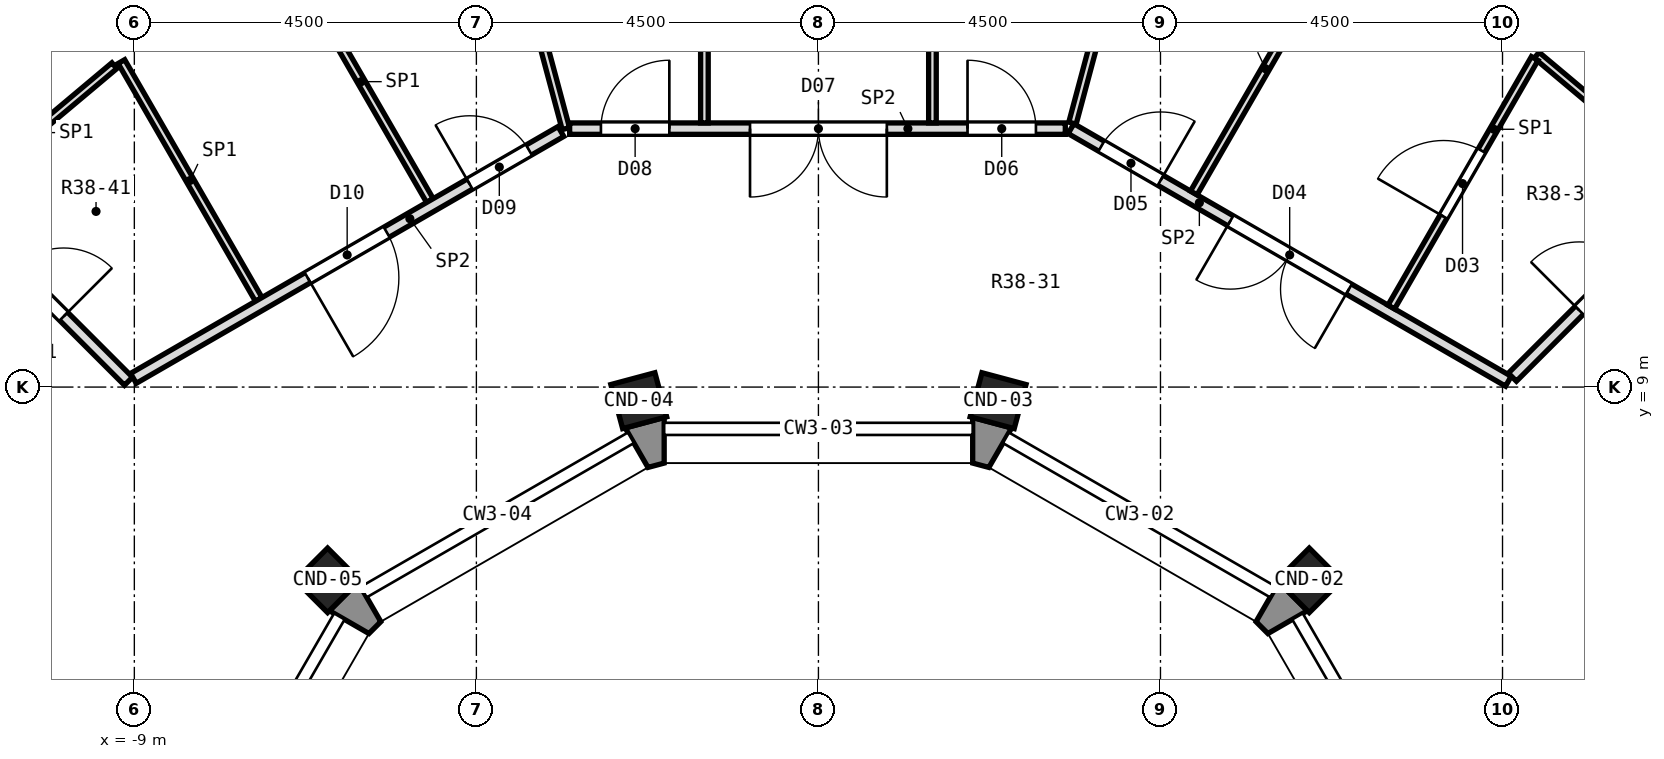
"""IFC4 building model, lengths in metres.
Left out: names, types, materials, properties, quantities, classifications, styles, units other than length and angle.
Written with IfcOpenShell. Run it as: python <this file> out.ifc"""

import sys

from ifc_helpers import new_model, si_unit, direction, frame, frame_2d, origin, origin_2d, place, context, subcontext, project, spatial, polyline, rectangle, outline, extrude, element, fill, save


model = new_model("IFC4")
c1 = context("Model", 3, precision=1e-05, world=origin(), true_north=direction((0.0, 1.0)))
c2 = subcontext(c1, "Body", "Model", "MODEL_VIEW")
j1 = project(units=[si_unit("LENGTHUNIT", "METRE"), si_unit("PLANEANGLEUNIT", "RADIAN")], contexts=[c1])
p1 = place(None, origin())
s1 = spatial("IfcSite", under=j1, at=p1, CompositionType="ELEMENT")
p2 = place(p1, origin())
s2 = spatial("IfcBuilding", under=s1, at=p2, CompositionType="ELEMENT")
p3 = place(p2, frame((0.0, 0.0, 279.2)))
s3 = spatial("IfcBuildingStorey", under=s2, at=p3, CompositionType="ELEMENT", Elevation=279.2)
for number, where, z_axis, x_axis in (
    (1, (6.458, 6.458, 0.0), (0.0, 0.0, 1.0), (0.707, 0.707, 0.0)),
    (2, (2.364, 8.821, 0.0), (0.0, 0.0, 1.0), (0.259, 0.966, 0.0)),
    (3, (-2.364, 8.821, 0.0), (0.0, 0.0, 1.0), (-0.259, 0.966, 0.0)),
    (4, (-6.458, 6.458, 0.0), (0.0, 0.0, 1.0), (-0.707, 0.707, 0.0)),
):
    element("IfcColumn", number, at=place(p3, frame(where, z_axis=z_axis, x_axis=x_axis)), inside=s3, PredefinedType="COLUMN", context=c2, shape_type="SweptSolid", body=[
        extrude(rectangle(XDim=0.6, YDim=0.6, at=origin_2d()), origin(), (0.0, 0.0, 1.0), 5.0),
    ])
p4 = place(p3, origin())
e5 = element("IfcWall", 5, at=p4, inside=s3, PredefinedType="SOLIDWALL", context=c2, shape_type="SweptSolid", body=[
    extrude(outline(polyline([(6.058, 6.433), (5.758, 5.914), (5.914, 5.758), (6.433, 6.058), (6.058, 6.433)])), origin(), (0.0, 0.0, 1.0), 4.45),
])
p5 = place(p3, origin())
e6 = element("IfcWall", 6, at=p5, inside=s3, PredefinedType="SOLIDWALL", context=c2, shape_type="SweptSolid", body=[
    extrude(outline(polyline([(2.029, 8.6), (2.029, 8.0), (2.242, 7.943), (2.542, 8.462), (2.029, 8.6)])), origin(), (0.0, 0.0, 1.0), 4.45),
])
p6 = place(p3, origin())
e7 = element("IfcWall", 7, at=p6, inside=s3, PredefinedType="SOLIDWALL", context=c2, shape_type="SweptSolid", body=[
    extrude(outline(polyline([(-2.542, 8.462), (-2.242, 7.943), (-2.029, 8.0), (-2.029, 8.6), (-2.542, 8.462)])), origin(), (0.0, 0.0, 1.0), 4.45),
])
p7 = place(p3, origin())
e8 = element("IfcWall", 8, at=p7, inside=s3, PredefinedType="SOLIDWALL", context=c2, shape_type="SweptSolid", body=[
    extrude(outline(polyline([(-6.433, 6.058), (-5.914, 5.758), (-5.758, 5.914), (-6.058, 6.433), (-6.433, 6.058)])), origin(), (0.0, 0.0, 1.0), 4.45),
])
p8 = place(p3, frame((-5.646, 21.072, 0.0), z_axis=(0.0, 0.0, 1.0), x_axis=(0.258728835498, -0.965949993365, 0.0)))
e9 = element("IfcWall", 9, at=p8, inside=s3, PredefinedType="PARTITIONING", context=c2, shape_type="SweptSolid", body=[
    extrude(rectangle(XDim=8.978, YDim=0.1, at=frame_2d((4.489, 0.0))), origin(), (0.0, 0.0, 1.0), 4.45),
])
p9 = place(p3, frame((-9.17, 13.282, 0.0), z_axis=(0.0, 0.0, 1.0), x_axis=(0.49998372882, -0.866034797751, 0.0)))
e10 = element("IfcWall", 10, at=p9, inside=s3, PredefinedType="PARTITIONING", context=c2, shape_type="SweptSolid", body=[
    extrude(rectangle(XDim=3.613, YDim=0.1, at=frame_2d((1.806, 0.0))), origin(), (0.0, 0.0, 1.0), 4.45),
])
p10 = place(p3, frame((-6.918, 14.582, 0.0), z_axis=(0.0, 0.0, 1.0), x_axis=(0.500071521611, -0.865984106825, 0.0)))
e11 = element("IfcWall", 11, at=p10, inside=s3, PredefinedType="PARTITIONING", context=c2, shape_type="SweptSolid", body=[
    extrude(rectangle(XDim=3.612, YDim=0.1, at=frame_2d((1.806, 0.0))), origin(), (0.0, 0.0, 1.0), 4.45),
])
p11 = place(p3, frame((-13.215, 13.215, 0.0), z_axis=(0.0, 0.0, 1.0), x_axis=(0.707106781187, -0.707106781187, 0.0)))
e12 = element("IfcWall", 12, at=p11, inside=s3, PredefinedType="PARTITIONING", context=c2, shape_type="SweptSolid", body=[
    extrude(rectangle(XDim=5.852, YDim=0.15, at=frame_2d((2.926, 0.0))), origin(), (0.0, 0.0, 1.0), 4.45),
])
p12 = place(p11, frame((3.746, 0.0, 0.0)))
e13 = element("IfcOpeningElement", 13, at=p12, cuts=e12, PredefinedType="OPENING", context=c2, shape_type="SweptSolid", body=[
    extrude(rectangle(XDim=0.9, YDim=2.1, at=frame_2d((0.45, 1.05))), frame((0.0, 0.087, 0.0), z_axis=(0.0, -1.0, 0.0), x_axis=(1.0, 0.0, 0.0)), (0.0, 0.0, 1.0), 0.174),
])
p13 = place(p3, frame((9.449, 13.366, 0.0), z_axis=(0.0, 0.0, 1.0), x_axis=(0.766094066965, -0.642728465653, 0.0)))
e14 = element("IfcWall", 14, at=p13, inside=s3, PredefinedType="PARTITIONING", context=c2, shape_type="SweptSolid", body=[
    extrude(rectangle(XDim=2.705, YDim=0.1, at=frame_2d((1.353, 0.0))), origin(), (0.0, 0.0, 1.0), 4.45),
])
p14 = place(p3, frame((3.323, 12.4, 0.0), z_axis=(0.0, 0.0, 1.0), x_axis=(0.865961614908, -0.500110469302, 0.0)))
e15 = element("IfcWall", 15, at=p14, inside=s3, PredefinedType="PARTITIONING", context=c2, shape_type="SweptSolid", body=[
    extrude(rectangle(XDim=6.645, YDim=0.15, at=frame_2d((3.322, 0.0))), origin(), (0.0, 0.0, 1.0), 4.45),
])
p15 = place(p14, frame((2.422, 0.0, 0.0)))
e16 = element("IfcOpeningElement", 16, at=p15, cuts=e15, PredefinedType="OPENING", context=c2, shape_type="SweptSolid", body=[
    extrude(rectangle(XDim=1.8, YDim=2.1, at=frame_2d((0.9, 1.05))), frame((0.0, 0.087, 0.0), z_axis=(0.0, -1.0, 0.0), x_axis=(1.0, 0.0, 0.0)), (0.0, 0.0, 1.0), 0.174),
])
p16 = place(p14, frame((0.461, 0.0, 0.0)))
e17 = element("IfcOpeningElement", 17, at=p16, cuts=e15, PredefinedType="OPENING", context=c2, shape_type="SweptSolid", body=[
    extrude(rectangle(XDim=0.9, YDim=2.1, at=frame_2d((0.45, 1.05))), frame((0.0, 0.087, 0.0), z_axis=(0.0, -1.0, 0.0), x_axis=(1.0, 0.0, 0.0)), (0.0, 0.0, 1.0), 0.174),
])
p17 = place(p3, frame((-3.273, 12.4, 0.0), z_axis=(0.0, 0.0, 1.0), x_axis=(1.0, 0.0, 0.0)))
e18 = element("IfcWall", 18, at=p17, inside=s3, PredefinedType="PARTITIONING", context=c2, shape_type="SweptSolid", body=[
    extrude(rectangle(XDim=6.521, YDim=0.15, at=frame_2d((3.26, 0.0))), origin(), (0.0, 0.0, 1.0), 4.45),
])
p18 = place(p17, frame((5.235, 0.0, 0.0)))
e19 = element("IfcOpeningElement", 19, at=p18, cuts=e18, PredefinedType="OPENING", context=c2, shape_type="SweptSolid", body=[
    extrude(rectangle(XDim=0.9, YDim=2.1, at=frame_2d((0.45, 1.05))), frame((0.0, 0.087, 0.0), z_axis=(0.0, -1.0, 0.0), x_axis=(1.0, 0.0, 0.0)), (0.0, 0.0, 1.0), 0.174),
])
p19 = place(p17, frame((2.373, 0.0, 0.0)))
e20 = element("IfcOpeningElement", 20, at=p19, cuts=e18, PredefinedType="OPENING", context=c2, shape_type="SweptSolid", body=[
    extrude(rectangle(XDim=1.8, YDim=2.1, at=frame_2d((0.9, 1.05))), frame((0.0, 0.087, 0.0), z_axis=(0.0, -1.0, 0.0), x_axis=(1.0, 0.0, 0.0)), (0.0, 0.0, 1.0), 0.174),
])
p20 = place(p17, frame((0.412, 0.0, 0.0)))
e21 = element("IfcOpeningElement", 21, at=p20, cuts=e18, PredefinedType="OPENING", context=c2, shape_type="SweptSolid", body=[
    extrude(rectangle(XDim=0.9, YDim=2.1, at=frame_2d((0.45, 1.05))), frame((0.0, 0.087, 0.0), z_axis=(0.0, -1.0, 0.0), x_axis=(1.0, 0.0, 0.0)), (0.0, 0.0, 1.0), 0.174),
])
p21 = place(p3, frame((-9.012, 9.115, 0.0), z_axis=(0.0, 0.0, 1.0), x_axis=(0.865967095912, 0.5001009786, 0.0)))
e22 = element("IfcWall", 22, at=p21, inside=s3, PredefinedType="PARTITIONING", context=c2, shape_type="SweptSolid", body=[
    extrude(rectangle(XDim=6.495, YDim=0.15, at=frame_2d((3.248, 0.0))), origin(), (0.0, 0.0, 1.0), 4.45),
])
p22 = place(p21, frame((5.109, 0.0, 0.0)))
e23 = element("IfcOpeningElement", 23, at=p22, cuts=e22, PredefinedType="OPENING", context=c2, shape_type="SweptSolid", body=[
    extrude(rectangle(XDim=0.9, YDim=2.1, at=frame_2d((0.45, 1.05))), frame((0.0, 0.087, 0.0), z_axis=(0.0, -1.0, 0.0), x_axis=(1.0, 0.0, 0.0)), (0.0, 0.0, 1.0), 0.174),
])
p23 = place(p21, frame((2.647, 0.0, 0.0)))
e24 = element("IfcOpeningElement", 24, at=p23, cuts=e22, PredefinedType="OPENING", context=c2, shape_type="SweptSolid", body=[
    extrude(rectangle(XDim=1.2, YDim=2.1, at=frame_2d((0.6, 1.05))), frame((0.0, 0.087, 0.0), z_axis=(0.0, -1.0, 0.0), x_axis=(1.0, 0.0, 0.0)), (0.0, 0.0, 1.0), 0.174),
])
p24 = place(p3, frame((-11.362, 11.467, 0.0), z_axis=(0.0, 0.0, 1.0), x_axis=(0.766083955689, 0.6427405175, 0.0)))
e25 = element("IfcWall", 25, at=p24, inside=s3, PredefinedType="PARTITIONING", context=c2, shape_type="SweptSolid", body=[
    extrude(rectangle(XDim=2.74, YDim=0.1, at=frame_2d((1.37, 0.0))), origin(), (0.0, 0.0, 1.0), 4.45),
])
p25 = place(p3, frame((9.13, 9.13, 0.0), z_axis=(0.0, 0.0, 1.0), x_axis=(0.707106781187, 0.707106781187, 0.0)))
e26 = element("IfcWall", 26, at=p25, inside=s3, PredefinedType="PARTITIONING", context=c2, shape_type="SweptSolid", body=[
    extrude(rectangle(XDim=5.777, YDim=0.15, at=frame_2d((2.888, 0.0))), origin(), (0.0, 0.0, 1.0), 4.45),
])
p26 = place(p25, frame((1.244, 0.0, 0.0)))
e27 = element("IfcOpeningElement", 27, at=p26, cuts=e26, PredefinedType="OPENING", context=c2, shape_type="SweptSolid", body=[
    extrude(rectangle(XDim=0.9, YDim=2.1, at=frame_2d((0.45, 1.05))), frame((0.0, 0.087, 0.0), z_axis=(0.0, -1.0, 0.0), x_axis=(1.0, 0.0, 0.0)), (0.0, 0.0, 1.0), 0.174),
])
p27 = place(p3, frame((7.537, 10.053, 0.0), z_axis=(0.0, 0.0, 1.0), x_axis=(0.499957569697, 0.866049899545, 0.0)))
e28 = element("IfcWall", 28, at=p27, inside=s3, PredefinedType="PARTITIONING", context=c2, shape_type="SweptSolid", body=[
    extrude(rectangle(XDim=3.775, YDim=0.1, at=frame_2d((1.888, 0.0))), origin(), (0.0, 0.0, 1.0), 4.45),
])
p28 = place(p27, frame((1.375, 0.0, 0.0)))
e29 = element("IfcOpeningElement", 29, at=p28, cuts=e28, PredefinedType="OPENING", context=c2, shape_type="SweptSolid", body=[
    extrude(rectangle(XDim=1.0, YDim=2.1, at=frame_2d((0.5, 1.05))), frame((0.0, 0.062, 0.0), z_axis=(0.0, -1.0, 0.0), x_axis=(1.0, 0.0, 0.0)), (0.0, 0.0, 1.0), 0.124),
])
p29 = place(p3, frame((4.938, 11.554, 0.0), z_axis=(0.0, 0.0, 1.0), x_axis=(0.50004158446, 0.866001393654, 0.0)))
e30 = element("IfcWall", 30, at=p29, inside=s3, PredefinedType="PARTITIONING", context=c2, shape_type="SweptSolid", body=[
    extrude(rectangle(XDim=3.775, YDim=0.1, at=frame_2d((1.887, 0.0))), origin(), (0.0, 0.0, 1.0), 4.45),
])
p30 = place(p3, frame((3.342, 12.472, 0.0), z_axis=(0.0, 0.0, 1.0), x_axis=(0.258684909749, 0.965961757767, 0.0)))
e31 = element("IfcWall", 31, at=p30, inside=s3, PredefinedType="PARTITIONING", context=c2, shape_type="SweptSolid", body=[
    extrude(rectangle(XDim=8.903, YDim=0.1, at=frame_2d((4.451, 0.0))), origin(), (0.0, 0.0, 1.0), 4.45),
])
for number, where, z_axis, x_axis in (
    (32, (1.5, 12.475, 0.0), (0.0, 0.0, 1.0), (0.0, 1.0, 0.0)),
    (33, (-1.5, 12.475, 0.0), (0.0, 0.0, 1.0), (0.0, 1.0, 0.0)),
):
    element("IfcWall", number, at=place(p3, frame(where, z_axis=z_axis, x_axis=x_axis)), inside=s3, PredefinedType="PARTITIONING", context=c2, shape_type="SweptSolid", body=[
        extrude(rectangle(XDim=4.232, YDim=0.1, at=frame_2d((2.116, 0.0))), origin(), (0.0, 0.0, 1.0), 4.45),
    ])
p31 = place(p26, origin())
e34 = element("IfcDoor", 34, at=p31, inside=s3, OperationType="SINGLE_SWING_LEFT", PredefinedType="DOOR", context=c2, shape_type="SweptSolid", body=[
    extrude(rectangle(XDim=0.9, YDim=2.1, at=frame_2d((0.45, 1.05))), frame((0.0, 0.025, 0.0), z_axis=(0.0, -1.0, 0.0), x_axis=(1.0, 0.0, 0.0)), (0.0, 0.0, 1.0), 0.05),
])
fill(e27, e34)
p32 = place(p28, origin())
e35 = element("IfcDoor", 35, at=p32, inside=s3, OperationType="SINGLE_SWING_LEFT", PredefinedType="DOOR", context=c2, shape_type="SweptSolid", body=[
    extrude(rectangle(XDim=1.0, YDim=2.1, at=frame_2d((0.5, 1.05))), frame((0.0, 0.025, 0.0), z_axis=(0.0, -1.0, 0.0), x_axis=(1.0, 0.0, 0.0)), (0.0, 0.0, 1.0), 0.05),
])
fill(e29, e35)
p33 = place(p15, frame((1.8, 0.0, 0.0), z_axis=(0.0, 0.0, 1.0), x_axis=(-1.0, 0.0, 0.0)))
e36 = element("IfcDoor", 36, at=p33, inside=s3, OperationType="DOUBLE_DOOR_SINGLE_SWING", PredefinedType="DOOR", context=c2, shape_type="SweptSolid", body=[
    extrude(rectangle(XDim=1.8, YDim=2.1, at=frame_2d((0.9, 1.05))), frame((0.0, 0.025, 0.0), z_axis=(0.0, -1.0, 0.0), x_axis=(1.0, 0.0, 0.0)), (0.0, 0.0, 1.0), 0.05),
])
fill(e16, e36)
p34 = place(p16, origin())
e37 = element("IfcDoor", 37, at=p34, inside=s3, OperationType="SINGLE_SWING_RIGHT", PredefinedType="DOOR", context=c2, shape_type="SweptSolid", body=[
    extrude(rectangle(XDim=0.9, YDim=2.1, at=frame_2d((0.45, 1.05))), frame((0.0, 0.025, 0.0), z_axis=(0.0, -1.0, 0.0), x_axis=(1.0, 0.0, 0.0)), (0.0, 0.0, 1.0), 0.05),
])
fill(e17, e37)
p35 = place(p18, origin())
e38 = element("IfcDoor", 38, at=p35, inside=s3, OperationType="SINGLE_SWING_LEFT", PredefinedType="DOOR", context=c2, shape_type="SweptSolid", body=[
    extrude(rectangle(XDim=0.9, YDim=2.1, at=frame_2d((0.45, 1.05))), frame((0.0, 0.025, 0.0), z_axis=(0.0, -1.0, 0.0), x_axis=(1.0, 0.0, 0.0)), (0.0, 0.0, 1.0), 0.05),
])
fill(e19, e38)
p36 = place(p19, frame((1.8, 0.0, 0.0), z_axis=(0.0, 0.0, 1.0), x_axis=(-1.0, 0.0, 0.0)))
e39 = element("IfcDoor", 39, at=p36, inside=s3, OperationType="DOUBLE_DOOR_SINGLE_SWING", PredefinedType="DOOR", context=c2, shape_type="SweptSolid", body=[
    extrude(rectangle(XDim=1.8, YDim=2.1, at=frame_2d((0.9, 1.05))), frame((0.0, 0.025, 0.0), z_axis=(0.0, -1.0, 0.0), x_axis=(1.0, 0.0, 0.0)), (0.0, 0.0, 1.0), 0.05),
])
fill(e20, e39)
p37 = place(p20, origin())
e40 = element("IfcDoor", 40, at=p37, inside=s3, OperationType="SINGLE_SWING_RIGHT", PredefinedType="DOOR", context=c2, shape_type="SweptSolid", body=[
    extrude(rectangle(XDim=0.9, YDim=2.1, at=frame_2d((0.45, 1.05))), frame((0.0, 0.025, 0.0), z_axis=(0.0, -1.0, 0.0), x_axis=(1.0, 0.0, 0.0)), (0.0, 0.0, 1.0), 0.05),
])
fill(e21, e40)
p38 = place(p22, origin())
e41 = element("IfcDoor", 41, at=p38, inside=s3, OperationType="SINGLE_SWING_LEFT", PredefinedType="DOOR", context=c2, shape_type="SweptSolid", body=[
    extrude(rectangle(XDim=0.9, YDim=2.1, at=frame_2d((0.45, 1.05))), frame((0.0, 0.025, 0.0), z_axis=(0.0, -1.0, 0.0), x_axis=(1.0, 0.0, 0.0)), (0.0, 0.0, 1.0), 0.05),
])
fill(e23, e41)
p39 = place(p23, frame((1.2, 0.0, 0.0), z_axis=(0.0, 0.0, 1.0), x_axis=(-1.0, 0.0, 0.0)))
e42 = element("IfcDoor", 42, at=p39, inside=s3, OperationType="SINGLE_SWING_RIGHT", PredefinedType="DOOR", context=c2, shape_type="SweptSolid", body=[
    extrude(rectangle(XDim=1.2, YDim=2.1, at=frame_2d((0.6, 1.05))), frame((0.0, 0.025, 0.0), z_axis=(0.0, -1.0, 0.0), x_axis=(1.0, 0.0, 0.0)), (0.0, 0.0, 1.0), 0.05),
])
fill(e24, e42)
p40 = place(p12, origin())
e43 = element("IfcDoor", 43, at=p40, inside=s3, OperationType="SINGLE_SWING_RIGHT", PredefinedType="DOOR", context=c2, shape_type="SweptSolid", body=[
    extrude(rectangle(XDim=0.9, YDim=2.1, at=frame_2d((0.45, 1.05))), frame((0.0, 0.025, 0.0), z_axis=(0.0, -1.0, 0.0), x_axis=(1.0, 0.0, 0.0)), (0.0, 0.0, 1.0), 0.05),
])
fill(e13, e43)
save(model, sys.argv[1])
